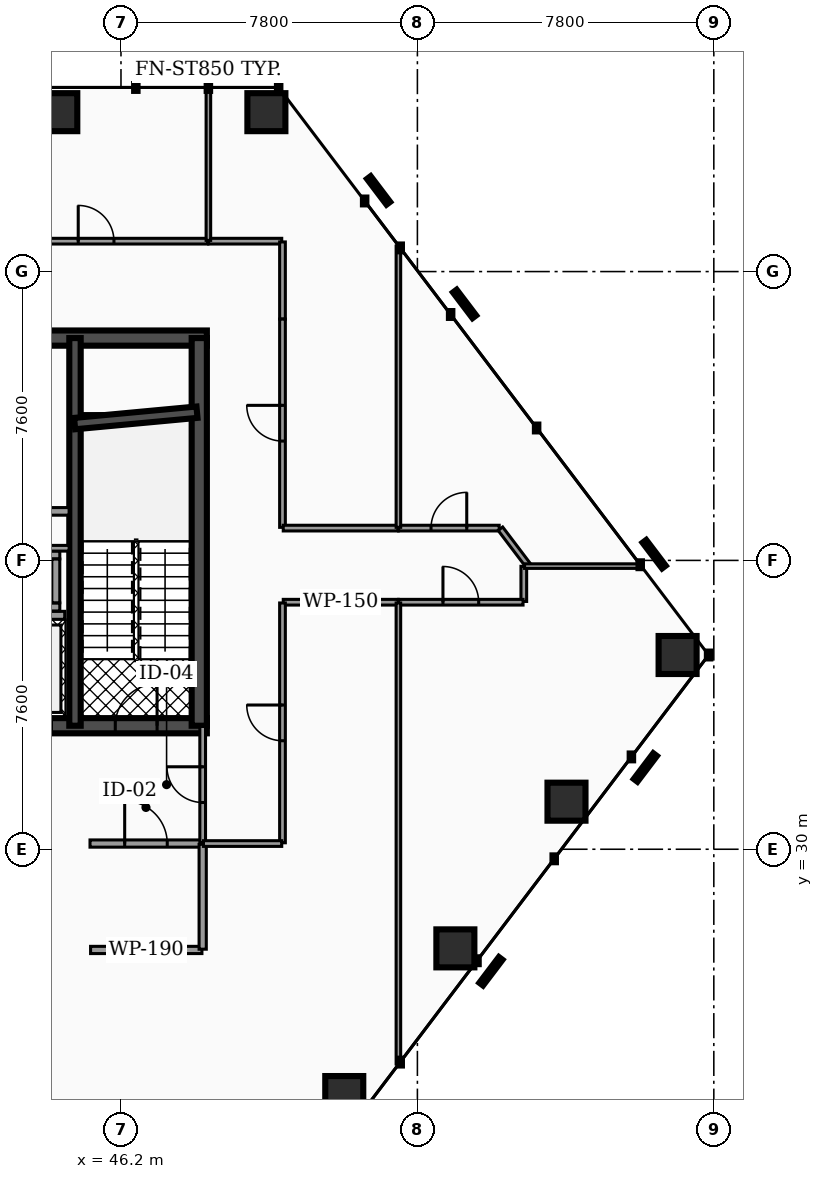
"""IFC4 building model, lengths in metres.
Left out: names, types, materials, properties, quantities, classifications, styles, units other than length and angle.
Written with IfcOpenShell. Run it as: python <this file> out.ifc"""

import sys

from ifc_helpers import new_model, si_unit, direction, frame, frame_2d, origin, origin_2d, place, context, subcontext, project, spatial, rectangle, hollow_rectangle, extrude, element, fill, save


model = new_model("IFC4")
c1 = context("Model", 3, precision=1e-05, world=origin(), true_north=direction((0.0, 1.0)))
c2 = subcontext(c1, "Body", "Model", "MODEL_VIEW")
j1 = project(units=[si_unit("LENGTHUNIT", "METRE"), si_unit("PLANEANGLEUNIT", "RADIAN")], contexts=[c1])
p1 = place(None, origin())
s1 = spatial("IfcSite", under=j1, at=p1, CompositionType="ELEMENT")
p2 = place(p1, origin())
s2 = spatial("IfcBuilding", under=s1, at=p2, CompositionType="ELEMENT")
p3 = place(p2, frame((0.0, 0.0, 39.78)))
s3 = spatial("IfcBuildingStorey", under=s2, at=p3, CompositionType="ELEMENT", Elevation=39.78)
p4 = place(p3, frame((28.4, 43.45, 0.0), z_axis=(0.0, 0.0, 1.0), x_axis=(1.0, 0.0, 0.0)))
e1 = element("IfcWall", 1, at=p4, inside=s3, PredefinedType="SHEAR", context=c2, shape_type="SweptSolid", body=[
    extrude(rectangle(XDim=20.06, YDim=0.4, at=frame_2d((10.03, 0.0))), origin(), (0.0, 0.0, 1.0), 3.82),
])
p5 = place(p3, frame((28.4, 33.25, 0.0), z_axis=(0.0, 0.0, 1.0), x_axis=(1.0, 0.0, 0.0)))
e2 = element("IfcWall", 2, at=p5, inside=s3, PredefinedType="SHEAR", context=c2, shape_type="SweptSolid", body=[
    extrude(rectangle(XDim=20.06, YDim=0.4, at=frame_2d((10.03, 0.0))), origin(), (0.0, 0.0, 1.0), 3.82),
])
p6 = place(p5, frame((4.03, 0.0, 0.0)))
e3 = element("IfcOpeningElement", 3, at=p6, cuts=e2, PredefinedType="OPENING", context=c2, shape_type="SweptSolid", body=[
    extrude(rectangle(XDim=1.1, YDim=2.15, at=frame_2d((0.55, 1.075))), frame((0.0, 0.21, 0.0), z_axis=(0.0, -1.0, 0.0), x_axis=(1.0, 0.0, 0.0)), (0.0, 0.0, 1.0), 0.42),
])
p7 = place(p5, frame((14.87, 0.0, 0.0)))
e4 = element("IfcOpeningElement", 4, at=p7, cuts=e2, PredefinedType="OPENING", context=c2, shape_type="SweptSolid", body=[
    extrude(rectangle(XDim=1.1, YDim=2.15, at=frame_2d((0.55, 1.075))), frame((0.0, 0.21, 0.0), z_axis=(0.0, -1.0, 0.0), x_axis=(1.0, 0.0, 0.0)), (0.0, 0.0, 1.0), 0.42),
])
p8 = place(p5, frame((1.31, 0.0, 0.0)))
e5 = element("IfcOpeningElement", 5, at=p8, cuts=e2, PredefinedType="OPENING", context=c2, shape_type="SweptSolid", body=[
    extrude(rectangle(XDim=1.1, YDim=2.2, at=frame_2d((0.55, 1.1))), frame((0.0, 0.21, 0.0), z_axis=(0.0, -1.0, 0.0), x_axis=(1.0, 0.0, 0.0)), (0.0, 0.0, 1.0), 0.42),
])
p9 = place(p5, frame((9.44, 0.0, 0.0)))
e6 = element("IfcOpeningElement", 6, at=p9, cuts=e2, PredefinedType="OPENING", context=c2, shape_type="SweptSolid", body=[
    extrude(rectangle(XDim=1.12, YDim=2.05, at=frame_2d((0.56, 1.025))), frame((0.0, 0.21, 0.0), z_axis=(0.0, -1.0, 0.0), x_axis=(1.0, 0.0, 0.0)), (0.0, 0.0, 1.0), 0.42),
])
p10 = place(p5, frame((17.65, 0.0, 0.0)))
e7 = element("IfcOpeningElement", 7, at=p10, cuts=e2, PredefinedType="OPENING", context=c2, shape_type="SweptSolid", body=[
    extrude(rectangle(XDim=1.1, YDim=2.2, at=frame_2d((0.55, 1.1))), frame((0.0, 0.21, 0.0), z_axis=(0.0, -1.0, 0.0), x_axis=(1.0, 0.0, 0.0)), (0.0, 0.0, 1.0), 0.42),
])
p11 = place(p3, frame((44.99, 33.25, 0.0), z_axis=(0.0, 0.0, 1.0), x_axis=(0.0, 1.0, 0.0)))
e8 = element("IfcWall", 8, at=p11, inside=s3, PredefinedType="SHEAR", context=c2, shape_type="SweptSolid", body=[
    extrude(rectangle(XDim=10.2, YDim=0.3, at=frame_2d((5.1, 0.0))), origin(), (0.0, 0.0, 1.0), 3.82),
])
p12 = place(p3, frame((48.26, 33.25, 0.0), z_axis=(0.0, 0.0, 1.0), x_axis=(0.0, 1.0, 0.0)))
e9 = element("IfcWall", 9, at=p12, inside=s3, PredefinedType="SHEAR", context=c2, shape_type="SweptSolid", body=[
    extrude(rectangle(XDim=10.2, YDim=0.4, at=frame_2d((5.1, 0.0))), origin(), (0.0, 0.0, 1.0), 3.82),
])
p13 = place(p3, frame((44.98, 41.2, 0.0), z_axis=(0.0, 0.0, 1.0), x_axis=(0.995686468965, 0.09278176286, 0.0)))
e10 = element("IfcWall", 10, at=p13, inside=s3, PredefinedType="SHEAR", context=c2, shape_type="SweptSolid", body=[
    extrude(rectangle(XDim=3.234, YDim=0.3, at=frame_2d((1.617, 0.0))), origin(), (0.0, 0.0, 1.0), 3.82),
])
for number, where, z_axis, x_axis in (
    (11, (50.026, 49.394, 0.0), (0.0, 0.0, 1.0), (1.0, 0.0, 0.0)),
    (12, (44.55, 49.394, 0.0), (0.0, 0.0, 1.0), (1.0, 0.0, 0.0)),
    (13, (52.075, 23.532, 0.0), (0.0, 0.0, 1.0), (1.0, 0.0, 0.0)),
    (14, (54.999, 27.392, 0.0), (0.0, 0.0, 1.0), (1.0, 0.0, 0.0)),
    (15, (57.923, 31.251, 0.0), (0.0, 0.0, 1.0), (1.0, 0.0, 0.0)),
    (16, (60.847, 35.111, 0.0), (0.0, 0.0, 1.0), (1.0, 0.0, 0.0)),
):
    element("IfcColumn", number, at=place(p3, frame(where, z_axis=z_axis, x_axis=x_axis)), inside=s3, PredefinedType="COLUMN", context=c2, shape_type="SweptSolid", body=[
        extrude(hollow_rectangle(XDim=1.0, YDim=1.0, WallThickness=0.05, at=origin_2d()), origin(), (0.0, 0.0, 1.0), 3.82),
    ])
p14 = place(p3, frame((42.92, 36.155, 0.0), z_axis=(0.0, 0.0, 1.0), x_axis=(1.0, 0.0, 0.0)))
e17 = element("IfcWall", 17, at=p14, inside=s3, PredefinedType="SOLIDWALL", context=c2, shape_type="SweptSolid", body=[
    extrude(rectangle(XDim=1.8, YDim=0.21, at=frame_2d((0.9, 0.0))), origin(), (0.0, 0.0, 1.0), 2.792),
])
for number, where, z_axis, x_axis in (
    (18, (42.99, 36.375, 0.0), (0.0, 0.0, 1.0), (1.0, 0.0, 0.0)),
    (19, (42.99, 37.745, 0.0), (0.0, 0.0, 1.0), (1.0, 0.0, 0.0)),
):
    element("IfcWall", number, at=place(p3, frame(where, z_axis=z_axis, x_axis=x_axis)), inside=s3, PredefinedType="SOLIDWALL", context=c2, shape_type="SweptSolid", body=[
        extrude(rectangle(XDim=1.6, YDim=0.21, at=frame_2d((0.8, 0.0))), origin(), (0.0, 0.0, 1.0), 3.82),
    ])
p15 = place(p3, frame((44.485, 36.485, 0.0), z_axis=(0.0, 0.0, 1.0), x_axis=(0.0, 1.0, 0.0)))
e20 = element("IfcWall", 20, at=p15, inside=s3, PredefinedType="SOLIDWALL", context=c2, shape_type="SweptSolid", body=[
    extrude(rectangle(XDim=1.15, YDim=0.21, at=frame_2d((0.575, 0.0))), origin(), (0.0, 0.0, 1.0), 3.82),
])
p16 = place(p3, frame((42.765, 38.89, 0.0), z_axis=(0.0, 0.0, 1.0), x_axis=(1.0, 0.0, 0.0)))
e21 = element("IfcWall", 21, at=p16, inside=s3, PredefinedType="PARTITIONING", context=c2, shape_type="SweptSolid", body=[
    extrude(rectangle(XDim=2.07, YDim=0.2, at=frame_2d((1.035, 0.0))), origin(), (0.0, 0.0, 1.0), 2.777),
])
p17 = place(p16, frame((0.595, 0.0, 0.0)))
e22 = element("IfcOpeningElement", 22, at=p17, cuts=e21, PredefinedType="OPENING", context=c2, shape_type="SweptSolid", body=[
    extrude(rectangle(XDim=0.88, YDim=2.05, at=frame_2d((0.44, 1.025))), frame((0.0, 0.11, 0.0), z_axis=(0.0, -1.0, 0.0), x_axis=(1.0, 0.0, 0.0)), (0.0, 0.0, 1.0), 0.22),
])
p18 = place(p3, frame((41.62, 37.92, 0.0), z_axis=(0.0, 0.0, 1.0), x_axis=(1.0, 0.0, 0.0)))
e23 = element("IfcWall", 23, at=p18, inside=s3, PredefinedType="PARTITIONING", context=c2, shape_type="SweptSolid", body=[
    extrude(rectangle(XDim=3.215, YDim=0.15, at=frame_2d((1.607, 0.0))), origin(), (0.0, 0.0, 1.0), 2.777),
])
p19 = place(p18, frame((0.337, 0.0, 0.0)))
e24 = element("IfcOpeningElement", 24, at=p19, cuts=e23, PredefinedType="OPENING", context=c2, shape_type="SweptSolid", body=[
    extrude(rectangle(XDim=0.94, YDim=2.05, at=frame_2d((0.47, 1.025))), frame((0.0, 0.085, 0.0), z_axis=(0.0, -1.0, 0.0), x_axis=(1.0, 0.0, 0.0)), (0.0, 0.0, 1.0), 0.17),
])
p20 = place(p3, frame((45.385, 30.15, 0.0), z_axis=(0.0, 0.0, 1.0), x_axis=(1.0, 0.0, 0.0)))
e25 = element("IfcWall", 25, at=p20, inside=s3, PredefinedType="PARTITIONING", context=c2, shape_type="SweptSolid", body=[
    extrude(rectangle(XDim=2.945, YDim=0.19, at=frame_2d((1.473, 0.0))), origin(), (0.0, 0.0, 1.0), 2.777),
])
p21 = place(p20, frame((0.913, 0.0, 0.0)))
e26 = element("IfcOpeningElement", 26, at=p21, cuts=e25, PredefinedType="OPENING", context=c2, shape_type="SweptSolid", body=[
    extrude(rectangle(XDim=1.12, YDim=2.05, at=frame_2d((0.56, 1.025))), frame((0.0, 0.105, 0.0), z_axis=(0.0, -1.0, 0.0), x_axis=(1.0, 0.0, 0.0)), (0.0, 0.0, 1.0), 0.21),
])
p22 = place(p3, frame((48.35, 30.17, 0.0), z_axis=(0.0, 0.0, 1.0), x_axis=(0.0, 1.0, 0.0)))
e27 = element("IfcWall", 27, at=p22, inside=s3, PredefinedType="PARTITIONING", context=c2, shape_type="SweptSolid", body=[
    extrude(rectangle(XDim=3.06, YDim=0.15, at=frame_2d((1.53, 0.0))), origin(), (0.0, 0.0, 1.0), 2.777),
])
p23 = place(p22, frame((1.06, 0.0, 0.0)))
e28 = element("IfcOpeningElement", 28, at=p23, cuts=e27, PredefinedType="OPENING", context=c2, shape_type="SweptSolid", body=[
    extrude(rectangle(XDim=0.94, YDim=2.05, at=frame_2d((0.47, 1.025))), frame((0.0, 0.085, 0.0), z_axis=(0.0, -1.0, 0.0), x_axis=(1.0, 0.0, 0.0)), (0.0, 0.0, 1.0), 0.17),
])
p24 = place(p3, frame((45.4, 27.35, 0.0), z_axis=(0.0, 0.0, 1.0), x_axis=(1.0, 0.0, 0.0)))
e29 = element("IfcWall", 29, at=p24, inside=s3, PredefinedType="PARTITIONING", context=c2, shape_type="SweptSolid", body=[
    extrude(rectangle(XDim=2.93, YDim=0.19, at=frame_2d((1.465, 0.0))), origin(), (0.0, 0.0, 1.0), 2.777),
])
p25 = place(p3, frame((48.35, 27.37, 0.0), z_axis=(0.0, 0.0, 1.0), x_axis=(0.0, 1.0, 0.0)))
e30 = element("IfcWall", 30, at=p25, inside=s3, PredefinedType="PARTITIONING", context=c2, shape_type="SweptSolid", body=[
    extrude(rectangle(XDim=2.76, YDim=0.19, at=frame_2d((1.38, 0.0))), origin(), (0.0, 0.0, 1.0), 2.777),
])
p26 = place(p3, frame((50.47, 36.5, 0.0), z_axis=(0.0, 0.0, 1.0), x_axis=(1.0, 0.0, 0.0)))
e31 = element("IfcWall", 31, at=p26, inside=s3, PredefinedType="PARTITIONING", context=c2, shape_type="SweptSolid", body=[
    extrude(rectangle(XDim=3.025, YDim=0.15, at=frame_2d((1.513, 0.0))), origin(), (0.0, 0.0, 1.0), 2.777),
])
p27 = place(p3, frame((50.45, 30.17, 0.0), z_axis=(0.0, 0.0, 1.0), x_axis=(0.0, 1.0, 0.0)))
e32 = element("IfcWall", 32, at=p27, inside=s3, PredefinedType="PARTITIONING", context=c2, shape_type="SweptSolid", body=[
    extrude(rectangle(XDim=6.31, YDim=0.15, at=frame_2d((3.155, 0.0))), origin(), (0.0, 0.0, 1.0), 2.777),
])
p28 = place(p27, frame((2.685, 0.0, 0.0)))
e33 = element("IfcOpeningElement", 33, at=p28, cuts=e32, PredefinedType="OPENING", context=c2, shape_type="SweptSolid", body=[
    extrude(rectangle(XDim=0.94, YDim=2.05, at=frame_2d((0.47, 1.025))), frame((0.0, 0.085, 0.0), z_axis=(0.0, -1.0, 0.0), x_axis=(1.0, 0.0, 0.0)), (0.0, 0.0, 1.0), 0.17),
])
p29 = place(p3, frame((48.37, 30.15, 0.0), z_axis=(0.0, 0.0, 1.0), x_axis=(1.0, 0.0, 0.0)))
e34 = element("IfcWall", 34, at=p29, inside=s3, PredefinedType="PARTITIONING", context=c2, shape_type="SweptSolid", body=[
    extrude(rectangle(XDim=2.06, YDim=0.15, at=frame_2d((1.03, 0.0))), origin(), (0.0, 0.0, 1.0), 2.777),
])
p30 = place(p3, frame((56.8, 36.52, 0.0), z_axis=(0.0, 0.0, 1.0), x_axis=(0.0, 1.0, 0.0)))
e35 = element("IfcWall", 35, at=p30, inside=s3, PredefinedType="PARTITIONING", context=c2, shape_type="SweptSolid", body=[
    extrude(rectangle(XDim=0.925, YDim=0.15, at=frame_2d((0.462, 0.0))), origin(), (0.0, 0.0, 1.0), 2.777),
])
p31 = place(p3, frame((53.505, 36.5, 0.0), z_axis=(0.0, 0.0, 1.0), x_axis=(1.0, 0.0, 0.0)))
e36 = element("IfcWall", 36, at=p31, inside=s3, PredefinedType="PARTITIONING", context=c2, shape_type="SweptSolid", body=[
    extrude(rectangle(XDim=3.275, YDim=0.15, at=frame_2d((1.638, 0.0))), origin(), (0.0, 0.0, 1.0), 2.777),
])
p32 = place(p31, frame((1.167, 0.0, 0.0)))
e37 = element("IfcOpeningElement", 37, at=p32, cuts=e36, PredefinedType="OPENING", context=c2, shape_type="SweptSolid", body=[
    extrude(rectangle(XDim=0.94, YDim=2.05, at=frame_2d((0.47, 1.025))), frame((0.0, 0.085, 0.0), z_axis=(0.0, -1.0, 0.0), x_axis=(1.0, 0.0, 0.0)), (0.0, 0.0, 1.0), 0.17),
])
p33 = place(p3, frame((53.505, 38.45, 0.0), z_axis=(0.0, 0.0, 1.0), x_axis=(1.0, 0.0, 0.0)))
e38 = element("IfcWall", 38, at=p33, inside=s3, PredefinedType="PARTITIONING", context=c2, shape_type="SweptSolid", body=[
    extrude(rectangle(XDim=2.647, YDim=0.15, at=frame_2d((1.324, 0.0))), origin(), (0.0, 0.0, 1.0), 2.777),
])
p34 = place(p33, frame((0.854, 0.0, 0.0)))
e39 = element("IfcOpeningElement", 39, at=p34, cuts=e38, PredefinedType="OPENING", context=c2, shape_type="SweptSolid", body=[
    extrude(rectangle(XDim=0.94, YDim=2.05, at=frame_2d((0.47, 1.025))), frame((0.0, 0.085, 0.0), z_axis=(0.0, -1.0, 0.0), x_axis=(1.0, 0.0, 0.0)), (0.0, 0.0, 1.0), 0.17),
])
p35 = place(p3, frame((56.184, 38.434, 0.0), z_axis=(0.0, 0.0, 1.0), x_axis=(0.603900079305, -0.797060031751, 0.0)))
e40 = element("IfcWall", 40, at=p35, inside=s3, PredefinedType="PARTITIONING", context=c2, shape_type="SweptSolid", body=[
    extrude(rectangle(XDim=1.22, YDim=0.15, at=frame_2d((0.61, 0.0))), origin(), (0.0, 0.0, 1.0), 2.777),
])
p36 = place(p3, frame((48.505, 46.0, 0.0), z_axis=(0.0, 0.0, 1.0), x_axis=(1.0, 0.0, 0.0)))
e41 = element("IfcWall", 41, at=p36, inside=s3, PredefinedType="PARTITIONING", context=c2, shape_type="SweptSolid", body=[
    extrude(rectangle(XDim=1.925, YDim=0.15, at=frame_2d((0.962, 0.0))), origin(), (0.0, 0.0, 1.0), 2.777),
])
p37 = place(p3, frame((50.45, 43.95, 0.0), z_axis=(0.0, 0.0, 1.0), x_axis=(0.0, 1.0, 0.0)))
e42 = element("IfcWall", 42, at=p37, inside=s3, PredefinedType="PARTITIONING", context=c2, shape_type="SweptSolid", body=[
    extrude(rectangle(XDim=2.03, YDim=0.15, at=frame_2d((1.015, 0.0))), origin(), (0.0, 0.0, 1.0), 2.777),
])
p38 = place(p3, frame((50.45, 38.47, 0.0), z_axis=(0.0, 0.0, 1.0), x_axis=(0.0, 1.0, 0.0)))
e43 = element("IfcWall", 43, at=p38, inside=s3, PredefinedType="PARTITIONING", context=c2, shape_type="SweptSolid", body=[
    extrude(rectangle(XDim=5.48, YDim=0.15, at=frame_2d((2.74, 0.0))), origin(), (0.0, 0.0, 1.0), 2.777),
])
p39 = place(p38, frame((2.27, 0.0, 0.0)))
e44 = element("IfcOpeningElement", 44, at=p39, cuts=e43, PredefinedType="OPENING", context=c2, shape_type="SweptSolid", body=[
    extrude(rectangle(XDim=0.94, YDim=2.05, at=frame_2d((0.47, 1.025))), frame((0.0, 0.085, 0.0), z_axis=(0.0, -1.0, 0.0), x_axis=(1.0, 0.0, 0.0)), (0.0, 0.0, 1.0), 0.17),
])
p40 = place(p3, frame((50.47, 38.45, 0.0), z_axis=(0.0, 0.0, 1.0), x_axis=(1.0, 0.0, 0.0)))
e45 = element("IfcWall", 45, at=p40, inside=s3, PredefinedType="PARTITIONING", context=c2, shape_type="SweptSolid", body=[
    extrude(rectangle(XDim=3.025, YDim=0.15, at=frame_2d((1.513, 0.0))), origin(), (0.0, 0.0, 1.0), 2.777),
])
p41 = place(p3, frame((42.605, 46.0, 0.0), z_axis=(0.0, 0.0, 1.0), x_axis=(1.0, 0.0, 0.0)))
e46 = element("IfcWall", 46, at=p41, inside=s3, PredefinedType="PARTITIONING", context=c2, shape_type="SweptSolid", body=[
    extrude(rectangle(XDim=5.88, YDim=0.15, at=frame_2d((2.94, 0.0))), origin(), (0.0, 0.0, 1.0), 2.777),
])
p42 = place(p41, frame((2.47, 0.0, 0.0)))
e47 = element("IfcOpeningElement", 47, at=p42, cuts=e46, PredefinedType="OPENING", context=c2, shape_type="SweptSolid", body=[
    extrude(rectangle(XDim=0.94, YDim=2.05, at=frame_2d((0.47, 1.025))), frame((0.0, 0.085, 0.0), z_axis=(0.0, -1.0, 0.0), x_axis=(1.0, 0.0, 0.0)), (0.0, 0.0, 1.0), 0.17),
])
p43 = place(p3, frame((53.5, 24.351, 0.0), z_axis=(0.0, 0.0, 1.0), x_axis=(0.0, 1.0, 0.0)))
e48 = element("IfcWall", 48, at=p43, inside=s3, PredefinedType="PARTITIONING", context=c2, shape_type="SweptSolid", body=[
    extrude(rectangle(XDim=12.129, YDim=0.12, at=frame_2d((6.064, 0.0))), origin(), (0.0, 0.0, 1.0), 2.777),
])
p44 = place(p3, frame((56.82, 37.45, 0.0), z_axis=(0.0, 0.0, 1.0), x_axis=(1.0, 0.0, 0.0)))
e49 = element("IfcWall", 49, at=p44, inside=s3, PredefinedType="PARTITIONING", context=c2, shape_type="SweptSolid", body=[
    extrude(rectangle(XDim=3.055, YDim=0.12, at=frame_2d((1.528, 0.0))), origin(), (0.0, 0.0, 1.0), 2.777),
])
p45 = place(p3, frame((53.5, 38.47, 0.0), z_axis=(0.0, 0.0, 1.0), x_axis=(0.0, 1.0, 0.0)))
e50 = element("IfcWall", 50, at=p45, inside=s3, PredefinedType="PARTITIONING", context=c2, shape_type="SweptSolid", body=[
    extrude(rectangle(XDim=7.401, YDim=0.12, at=frame_2d((3.7, 0.0))), origin(), (0.0, 0.0, 1.0), 2.777),
])
p46 = place(p3, frame((48.5, 46.02, 0.0), z_axis=(0.0, 0.0, 1.0), x_axis=(0.0, 1.0, 0.0)))
e51 = element("IfcWall", 51, at=p46, inside=s3, PredefinedType="PARTITIONING", context=c2, shape_type="SweptSolid", body=[
    extrude(rectangle(XDim=4.009, YDim=0.12, at=frame_2d((2.005, 0.0))), origin(), (0.0, 0.0, 1.0), 2.777),
])
p47 = place(p10, origin())
e52 = element("IfcDoor", 52, at=p47, inside=s3, OperationType="SINGLE_SWING_RIGHT", PredefinedType="DOOR", context=c2, shape_type="SweptSolid", body=[
    extrude(rectangle(XDim=1.1, YDim=2.2, at=frame_2d((0.55, 1.1))), frame((0.0, 0.025, 0.0), z_axis=(0.0, -1.0, 0.0), x_axis=(1.0, 0.0, 0.0)), (0.0, 0.0, 1.0), 0.05),
])
fill(e7, e52)
p48 = place(p21, origin())
e53 = element("IfcDoor", 53, at=p48, inside=s3, OperationType="SINGLE_SWING_LEFT", PredefinedType="DOOR", context=c2, shape_type="SweptSolid", body=[
    extrude(rectangle(XDim=1.12, YDim=2.05, at=frame_2d((0.56, 1.025))), frame((0.0, 0.025, 0.0), z_axis=(0.0, -1.0, 0.0), x_axis=(1.0, 0.0, 0.0)), (0.0, 0.0, 1.0), 0.05),
])
fill(e26, e53)
p49 = place(p23, origin())
e54 = element("IfcDoor", 54, at=p49, inside=s3, OperationType="SINGLE_SWING_RIGHT", PredefinedType="DOOR", context=c2, shape_type="SweptSolid", body=[
    extrude(rectangle(XDim=0.94, YDim=2.05, at=frame_2d((0.47, 1.025))), frame((0.0, 0.025, 0.0), z_axis=(0.0, -1.0, 0.0), x_axis=(1.0, 0.0, 0.0)), (0.0, 0.0, 1.0), 0.05),
])
fill(e28, e54)
p50 = place(p28, origin())
e55 = element("IfcDoor", 55, at=p50, inside=s3, OperationType="SINGLE_SWING_RIGHT", PredefinedType="DOOR", context=c2, shape_type="SweptSolid", body=[
    extrude(rectangle(XDim=0.94, YDim=2.05, at=frame_2d((0.47, 1.025))), frame((0.0, 0.025, 0.0), z_axis=(0.0, -1.0, 0.0), x_axis=(1.0, 0.0, 0.0)), (0.0, 0.0, 1.0), 0.05),
])
fill(e33, e55)
p51 = place(p32, origin())
e56 = element("IfcDoor", 56, at=p51, inside=s3, OperationType="SINGLE_SWING_LEFT", PredefinedType="DOOR", context=c2, shape_type="SweptSolid", body=[
    extrude(rectangle(XDim=0.94, YDim=2.05, at=frame_2d((0.47, 1.025))), frame((0.0, 0.025, 0.0), z_axis=(0.0, -1.0, 0.0), x_axis=(1.0, 0.0, 0.0)), (0.0, 0.0, 1.0), 0.05),
])
fill(e37, e56)
p52 = place(p34, origin())
e57 = element("IfcDoor", 57, at=p52, inside=s3, OperationType="SINGLE_SWING_RIGHT", PredefinedType="DOOR", context=c2, shape_type="SweptSolid", body=[
    extrude(rectangle(XDim=0.94, YDim=2.05, at=frame_2d((0.47, 1.025))), frame((0.0, 0.025, 0.0), z_axis=(0.0, -1.0, 0.0), x_axis=(1.0, 0.0, 0.0)), (0.0, 0.0, 1.0), 0.05),
])
fill(e39, e57)
p53 = place(p39, origin())
e58 = element("IfcDoor", 58, at=p53, inside=s3, OperationType="SINGLE_SWING_RIGHT", PredefinedType="DOOR", context=c2, shape_type="SweptSolid", body=[
    extrude(rectangle(XDim=0.94, YDim=2.05, at=frame_2d((0.47, 1.025))), frame((0.0, 0.025, 0.0), z_axis=(0.0, -1.0, 0.0), x_axis=(1.0, 0.0, 0.0)), (0.0, 0.0, 1.0), 0.05),
])
fill(e44, e58)
p54 = place(p42, origin())
e59 = element("IfcDoor", 59, at=p54, inside=s3, OperationType="SINGLE_SWING_LEFT", PredefinedType="DOOR", context=c2, shape_type="SweptSolid", body=[
    extrude(rectangle(XDim=0.94, YDim=2.05, at=frame_2d((0.47, 1.025))), frame((0.0, 0.025, 0.0), z_axis=(0.0, -1.0, 0.0), x_axis=(1.0, 0.0, 0.0)), (0.0, 0.0, 1.0), 0.05),
])
fill(e47, e59)
save(model, sys.argv[1])
